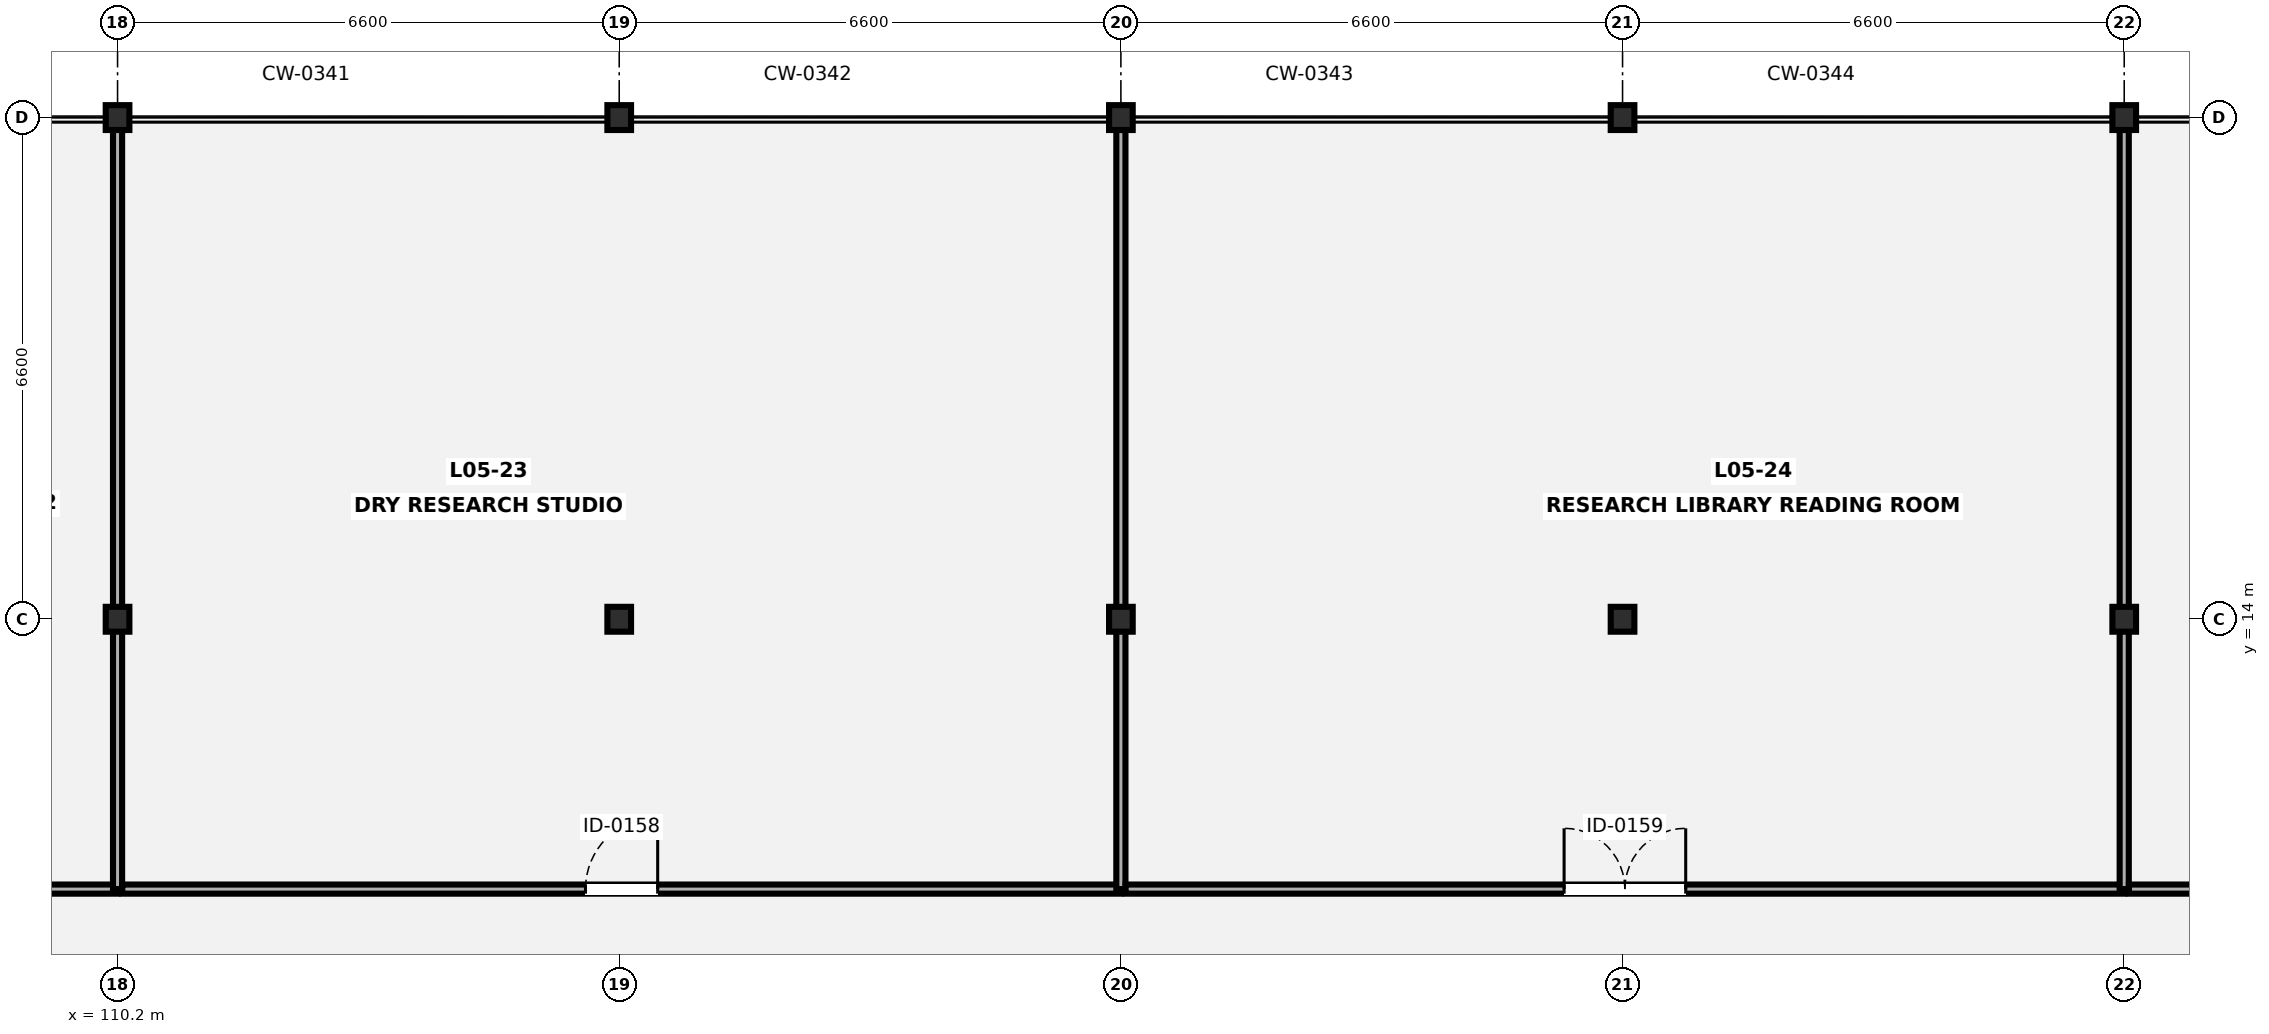
"""IFC4 building model, lengths in metres.
Left out: names, types, materials, properties, quantities, classifications, styles, units other than length and angle.
Written with IfcOpenShell. Run it as: python <this file> out.ifc"""

import sys

from ifc_helpers import new_model, si_unit, direction, frame, frame_2d, origin, origin_2d, place, context, subcontext, project, spatial, rectangle, i_section, extrude, element, fill, save


model = new_model("IFC4")
c1 = context("Model", 3, precision=1e-05, world=origin(), true_north=direction((0.0, 1.0)))
c2 = subcontext(c1, "Body", "Model", "MODEL_VIEW")
j1 = project(units=[si_unit("LENGTHUNIT", "METRE"), si_unit("PLANEANGLEUNIT", "RADIAN")], contexts=[c1])
p1 = place(None, origin())
s1 = spatial("IfcSite", under=j1, at=p1, CompositionType="ELEMENT")
p2 = place(p1, origin())
s2 = spatial("IfcBuilding", under=s1, at=p2, CompositionType="ELEMENT")
p3 = place(p2, frame((0.0, 0.0, 21.7)))
s3 = spatial("IfcBuildingStorey", under=s2, at=p3, CompositionType="ELEMENT", Elevation=21.7)
for number, where, z_axis, x_axis in (
    (1, (110.2, 14.0, 0.0), (0.0, 0.0, 1.0), (1.0, 0.0, 0.0)),
    (2, (110.2, 20.6, 0.0), (0.0, 0.0, 1.0), (1.0, 0.0, 0.0)),
    (3, (116.8, 14.0, 0.0), (0.0, 0.0, 1.0), (1.0, 0.0, 0.0)),
    (4, (116.8, 20.6, 0.0), (0.0, 0.0, 1.0), (1.0, 0.0, 0.0)),
    (5, (123.4, 14.0, 0.0), (0.0, 0.0, 1.0), (1.0, 0.0, 0.0)),
    (6, (123.4, 20.6, 0.0), (0.0, 0.0, 1.0), (1.0, 0.0, 0.0)),
    (7, (130.0, 14.0, 0.0), (0.0, 0.0, 1.0), (1.0, 0.0, 0.0)),
    (8, (130.0, 20.6, 0.0), (0.0, 0.0, 1.0), (1.0, 0.0, 0.0)),
    (9, (136.6, 14.0, 0.0), (0.0, 0.0, 1.0), (1.0, 0.0, 0.0)),
    (10, (136.6, 20.6, 0.0), (0.0, 0.0, 1.0), (1.0, 0.0, 0.0)),
):
    element("IfcColumn", number, at=place(p3, frame(where, z_axis=z_axis, x_axis=x_axis)), inside=s3, PredefinedType="COLUMN", context=c2, shape_type="SweptSolid", body=[
        extrude(i_section(OverallWidth=0.311, OverallDepth=0.327, WebThickness=0.016, FlangeThickness=0.025, FilletRadius=0.017, at=origin_2d()), origin(), (0.0, 0.0, 1.0), 4.2),
    ])
p4 = place(p3, frame((103.6, 10.45, 0.0), z_axis=(0.0, 0.0, 1.0), x_axis=(1.0, 0.0, 0.0)))
e11 = element("IfcWall", 11, at=p4, inside=s3, PredefinedType="PARTITIONING", context=c2, shape_type="SweptSolid", body=[
    extrude(rectangle(XDim=6.6, YDim=0.12, at=frame_2d((3.3, 0.0))), origin(), (0.0, 0.0, 1.0), 3.546),
])
p5 = place(p4, frame((2.76, 0.0, 0.0)))
e12 = element("IfcOpeningElement", 12, at=p5, cuts=e11, PredefinedType="OPENING", context=c2, shape_type="SweptSolid", body=[
    extrude(rectangle(XDim=1.08, YDim=2.12, at=frame_2d((0.54, 1.06))), frame((0.0, 0.07, 0.0), z_axis=(0.0, -1.0, 0.0), x_axis=(1.0, 0.0, 0.0)), (0.0, 0.0, 1.0), 0.14),
])
p6 = place(p3, frame((110.2, 10.45, 0.0), z_axis=(0.0, 0.0, 1.0), x_axis=(0.0, 1.0, 0.0)))
e13 = element("IfcWall", 13, at=p6, inside=s3, PredefinedType="PARTITIONING", context=c2, shape_type="SweptSolid", body=[
    extrude(rectangle(XDim=10.15, YDim=0.12, at=frame_2d((5.075, 0.0))), origin(), (0.0, 0.0, 1.0), 3.372),
])
p7 = place(p3, frame((110.262, 10.45, 0.0), z_axis=(0.0, 0.0, 1.0), x_axis=(1.0, 0.0, 0.0)))
e14 = element("IfcWall", 14, at=p7, inside=s3, PredefinedType="PARTITIONING", context=c2, shape_type="SweptSolid", body=[
    extrude(rectangle(XDim=13.138, YDim=0.12, at=frame_2d((6.569, 0.0))), origin(), (0.0, 0.0, 1.0), 3.546),
])
p8 = place(p7, frame((6.094, 0.0, 0.0)))
e15 = element("IfcOpeningElement", 15, at=p8, cuts=e14, PredefinedType="OPENING", context=c2, shape_type="SweptSolid", body=[
    extrude(rectangle(XDim=0.95, YDim=2.1, at=frame_2d((0.475, 1.05))), frame((0.0, 0.07, 0.0), z_axis=(0.0, -1.0, 0.0), x_axis=(1.0, 0.0, 0.0)), (0.0, 0.0, 1.0), 0.14),
])
p9 = place(p3, frame((123.4, 10.45, 0.0), z_axis=(0.0, 0.0, 1.0), x_axis=(0.0, 1.0, 0.0)))
e16 = element("IfcWall", 16, at=p9, inside=s3, PredefinedType="PARTITIONING", context=c2, shape_type="SweptSolid", body=[
    extrude(rectangle(XDim=10.15, YDim=0.12, at=frame_2d((5.075, 0.0))), origin(), (0.0, 0.0, 1.0), 3.372),
])
p10 = place(p3, frame((123.462, 10.45, 0.0), z_axis=(0.0, 0.0, 1.0), x_axis=(1.0, 0.0, 0.0)))
e17 = element("IfcWall", 17, at=p10, inside=s3, PredefinedType="PARTITIONING", context=c2, shape_type="SweptSolid", body=[
    extrude(rectangle(XDim=13.138, YDim=0.12, at=frame_2d((6.569, 0.0))), origin(), (0.0, 0.0, 1.0), 3.546),
])
p11 = place(p10, frame((5.769, 0.0, 0.0)))
e18 = element("IfcOpeningElement", 18, at=p11, cuts=e17, PredefinedType="OPENING", context=c2, shape_type="SweptSolid", body=[
    extrude(rectangle(XDim=1.6, YDim=2.18, at=frame_2d((0.8, 1.09))), frame((0.0, 0.07, 0.0), z_axis=(0.0, -1.0, 0.0), x_axis=(1.0, 0.0, 0.0)), (0.0, 0.0, 1.0), 0.14),
])
p12 = place(p3, frame((136.6, 10.45, 0.0), z_axis=(0.0, 0.0, 1.0), x_axis=(0.0, 1.0, 0.0)))
e19 = element("IfcWall", 19, at=p12, inside=s3, PredefinedType="PARTITIONING", context=c2, shape_type="SweptSolid", body=[
    extrude(rectangle(XDim=10.15, YDim=0.12, at=frame_2d((5.075, 0.0))), origin(), (0.0, 0.0, 1.0), 3.372),
])
p13 = place(p3, frame((136.662, 10.45, 0.0), z_axis=(0.0, 0.0, 1.0), x_axis=(1.0, 0.0, 0.0)))
e20 = element("IfcWall", 20, at=p13, inside=s3, PredefinedType="PARTITIONING", context=c2, shape_type="SweptSolid", body=[
    extrude(rectangle(XDim=13.138, YDim=0.12, at=frame_2d((6.569, 0.0))), origin(), (0.0, 0.0, 1.0), 3.546),
])
p14 = place(p13, frame((5.844, 0.0, 0.0)))
e21 = element("IfcOpeningElement", 21, at=p14, cuts=e20, PredefinedType="OPENING", context=c2, shape_type="SweptSolid", body=[
    extrude(rectangle(XDim=1.45, YDim=2.12, at=frame_2d((0.725, 1.06))), frame((0.0, 0.07, 0.0), z_axis=(0.0, -1.0, 0.0), x_axis=(1.0, 0.0, 0.0)), (0.0, 0.0, 1.0), 0.14),
])
p15 = place(p8, origin())
e22 = element("IfcDoor", 22, at=p15, inside=s3, OperationType="SINGLE_SWING_RIGHT", PredefinedType="DOOR", context=c2, shape_type="SweptSolid", body=[
    extrude(rectangle(XDim=0.95, YDim=2.1, at=frame_2d((0.475, 1.05))), frame((0.0, 0.025, 0.0), z_axis=(0.0, -1.0, 0.0), x_axis=(1.0, 0.0, 0.0)), (0.0, 0.0, 1.0), 0.05),
])
fill(e15, e22)
p16 = place(p11, origin())
e23 = element("IfcDoor", 23, at=p16, inside=s3, OperationType="DOUBLE_DOOR_SINGLE_SWING", PredefinedType="DOOR", context=c2, shape_type="SweptSolid", body=[
    extrude(rectangle(XDim=1.6, YDim=2.18, at=frame_2d((0.8, 1.09))), frame((0.0, 0.025, 0.0), z_axis=(0.0, -1.0, 0.0), x_axis=(1.0, 0.0, 0.0)), (0.0, 0.0, 1.0), 0.05),
])
fill(e18, e23)
save(model, sys.argv[1])
